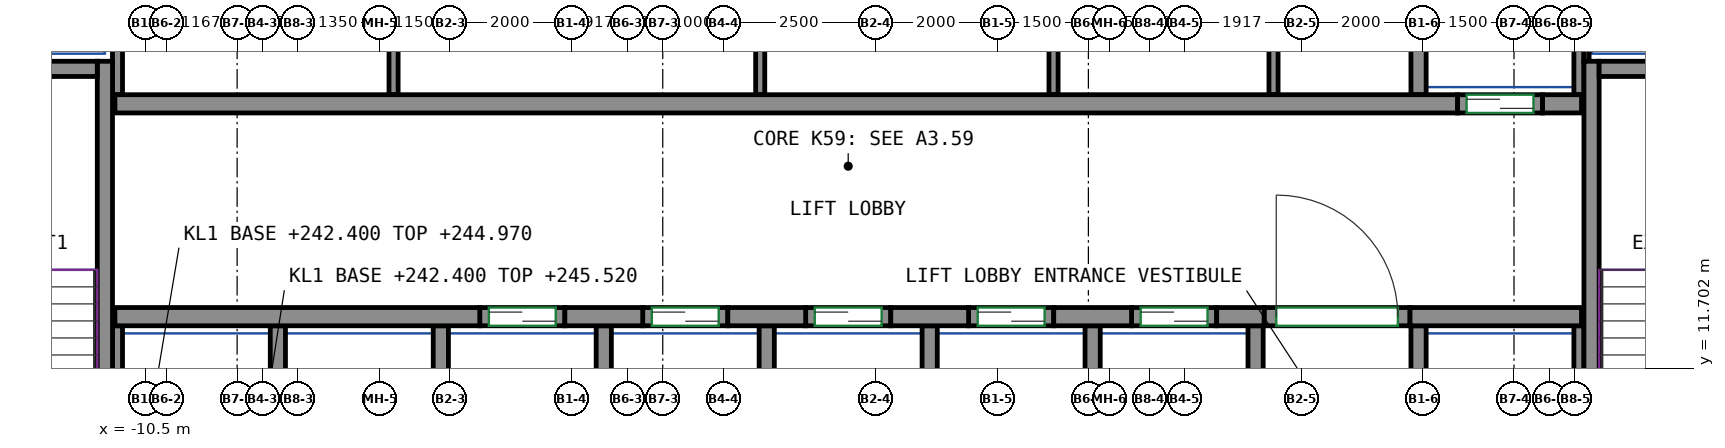
"""IFC4 building model, lengths in metres.
Left out: names, types, materials, properties, quantities, classifications, styles, units other than length and angle.
Written with IfcOpenShell. Run it as: python <this file> out.ifc"""

import sys

from ifc_helpers import new_model, si_unit, direction, frame, frame_2d, origin, place, context, subcontext, project, spatial, rectangle, extrude, source, transform, mapped, element, fill, save


model = new_model("IFC4")
c1 = context("Model", 3, precision=1e-05, world=origin(), true_north=direction((0.0, 1.0)))
c2 = subcontext(c1, "Body", "Model", "MODEL_VIEW")
j1 = project(units=[si_unit("LENGTHUNIT", "METRE"), si_unit("PLANEANGLEUNIT", "RADIAN")], contexts=[c1])
p1 = place(None, origin())
s1 = spatial("IfcSite", under=j1, at=p1, CompositionType="ELEMENT")
p2 = place(p1, origin())
s2 = spatial("IfcBuilding", under=s1, at=p2, CompositionType="ELEMENT")
p3 = place(p2, frame((0.0, 0.0, 242.4)))
s3 = spatial("IfcBuildingStorey", under=s2, at=p3, CompositionType="ELEMENT", Elevation=242.4)
m1 = source(origin(), c2, "Body", "SweptSolid", [
    extrude(rectangle(XDim=7.75, YDim=0.25, at=frame_2d((3.875, 0.0))), origin(), (0.0, 0.0, 1.0), 3.12),
])
p4 = place(p3, frame((-11.175, 9.0, 0.0), z_axis=(0.0, 0.0, 1.0), x_axis=(0.0, 1.0, 0.0)))
e1 = element("IfcWall", 1, at=p4, inside=s3, PredefinedType="SHEAR", context=c2, shape_type="MappedRepresentation", body=[
    mapped(m1, transform((0.0, 0.0, 0.0))),
])
m2 = source(origin(), c2, "Body", "SweptSolid", [
    extrude(rectangle(XDim=3.7, YDim=0.25, at=frame_2d((1.85, 0.0))), origin(), (0.0, 0.0, 1.0), 3.12),
])
p5 = place(p3, frame((-15.0, 16.625, 0.0), z_axis=(0.0, 0.0, 1.0), x_axis=(1.0, 0.0, 0.0)))
e2 = element("IfcWall", 2, at=p5, inside=s3, PredefinedType="SHEAR", context=c2, shape_type="MappedRepresentation", body=[
    mapped(m2, transform((0.0, 0.0, 0.0))),
])
p6 = place(p3, frame((13.275, 9.0, 0.0), z_axis=(0.0, 0.0, 1.0), x_axis=(0.0, 1.0, 0.0)))
e3 = element("IfcWall", 3, at=p6, inside=s3, PredefinedType="SHEAR", context=c2, shape_type="MappedRepresentation", body=[
    mapped(m1, transform((0.0, 0.0, 0.0))),
])
m3 = source(origin(), c2, "Body", "SweptSolid", [
    extrude(rectangle(XDim=3.7, YDim=0.25, at=frame_2d((1.85, 0.0))), origin(), (0.0, 0.0, 1.0), 3.12),
])
p7 = place(p3, frame((13.4, 16.625, 0.0), z_axis=(0.0, 0.0, 1.0), x_axis=(1.0, 0.0, 0.0)))
e4 = element("IfcWall", 4, at=p7, inside=s3, PredefinedType="SHEAR", context=c2, shape_type="MappedRepresentation", body=[
    mapped(m3, transform((0.0, 0.0, 0.0))),
])
m4 = source(origin(), c2, "Body", "SweptSolid", [
    extrude(rectangle(XDim=6.0, YDim=0.3, at=frame_2d((3.0, 0.0))), origin(), (0.0, 0.0, 1.0), 3.12),
])
p8 = place(p3, frame((-11.01, 12.55, 0.0), z_axis=(0.0, 0.0, 1.0), x_axis=(1.0, 0.0, 0.0)))
e5 = element("IfcWall", 5, at=p8, inside=s3, PredefinedType="SHEAR", context=c2, shape_type="MappedRepresentation", body=[
    mapped(m4, transform((0.0, 0.0, 0.0))),
])
m5 = source(origin(), c2, "Body", "SweptSolid", [
    extrude(rectangle(XDim=1.28, YDim=0.3, at=frame_2d((0.64, 0.0))), origin(), (0.0, 0.0, 1.0), 3.12),
])
for number, where, z_axis, x_axis in (
    (6, (-3.61, 12.55, 0.0), (0.0, 0.0, 1.0), (1.0, 0.0, 0.0)),
    (7, (-0.93, 12.55, 0.0), (0.0, 0.0, 1.0), (1.0, 0.0, 0.0)),
    (8, (1.75, 12.55, 0.0), (0.0, 0.0, 1.0), (1.0, 0.0, 0.0)),
    (9, (4.43, 12.55, 0.0), (0.0, 0.0, 1.0), (1.0, 0.0, 0.0)),
):
    element("IfcWall", number, at=place(p3, frame(where, z_axis=z_axis, x_axis=x_axis)), inside=s3, PredefinedType="SHEAR", context=c2, shape_type="MappedRepresentation", body=[
        mapped(m5, transform((0.0, 0.0, 0.0))),
    ])
m6 = source(origin(), c2, "Body", "SweptSolid", [
    extrude(rectangle(XDim=0.78, YDim=0.3, at=frame_2d((0.39, 0.0))), origin(), (0.0, 0.0, 1.0), 3.12),
])
p9 = place(p3, frame((7.11, 12.55, 0.0), z_axis=(0.0, 0.0, 1.0), x_axis=(1.0, 0.0, 0.0)))
e10 = element("IfcWall", 10, at=p9, inside=s3, PredefinedType="SHEAR", context=c2, shape_type="MappedRepresentation", body=[
    mapped(m6, transform((0.0, 0.0, 0.0))),
])
m7 = source(origin(), c2, "Body", "SweptSolid", [
    extrude(rectangle(XDim=2.82, YDim=0.3, at=frame_2d((1.41, 0.0))), origin(), (0.0, 0.0, 1.0), 3.12),
])
p10 = place(p3, frame((10.29, 12.55, 0.0), z_axis=(0.0, 0.0, 1.0), x_axis=(1.0, 0.0, 0.0)))
e11 = element("IfcWall", 11, at=p10, inside=s3, PredefinedType="SHEAR", context=c2, shape_type="MappedRepresentation", body=[
    mapped(m7, transform((0.0, 0.0, 0.0))),
])
m8 = source(origin(), c2, "Body", "SweptSolid", [
    extrude(rectangle(XDim=22.08, YDim=0.3, at=frame_2d((11.04, 0.0))), origin(), (0.0, 0.0, 1.0), 3.12),
])
p11 = place(p3, frame((-11.01, 16.05, 0.0), z_axis=(0.0, 0.0, 1.0), x_axis=(1.0, 0.0, 0.0)))
e12 = element("IfcWall", 12, at=p11, inside=s3, PredefinedType="SHEAR", context=c2, shape_type="MappedRepresentation", body=[
    mapped(m8, transform((0.0, 0.0, 0.0))),
])
m9 = source(origin(), c2, "Body", "SweptSolid", [
    extrude(rectangle(XDim=0.64, YDim=0.3, at=frame_2d((0.32, 0.0))), origin(), (0.0, 0.0, 1.0), 3.12),
])
p12 = place(p3, frame((12.47, 16.05, 0.0), z_axis=(0.0, 0.0, 1.0), x_axis=(1.0, 0.0, 0.0)))
e13 = element("IfcWall", 13, at=p12, inside=s3, PredefinedType="SHEAR", context=c2, shape_type="MappedRepresentation", body=[
    mapped(m9, transform((0.0, 0.0, 0.0))),
])
m10 = source(origin(), c2, "Body", "SweptSolid", [
    extrude(rectangle(XDim=1.4, YDim=0.3, at=frame_2d((0.7, 0.0))), origin(), (0.0, 0.0, 1.0), 3.12),
])
p13 = place(p3, frame((-5.01, 12.55, 0.0), z_axis=(0.0, 0.0, 1.0), x_axis=(1.0, 0.0, 0.0)))
e14 = element("IfcWall", 14, at=p13, inside=s3, PredefinedType="PARTITIONING", context=c2, shape_type="MappedRepresentation", body=[
    mapped(m10, transform((0.0, 0.0, 0.0))),
])
p14 = place(p13, frame((0.15, 0.0, 0.0)))
e15 = element("IfcOpeningElement", 15, at=p14, cuts=e14, PredefinedType="OPENING", context=c2, shape_type="SweptSolid", body=[
    extrude(rectangle(XDim=1.1, YDim=2.1, at=frame_2d((0.55, 1.05))), frame((0.0, 0.16, 0.0), z_axis=(0.0, -1.0, 0.0), x_axis=(1.0, 0.0, 0.0)), (0.0, 0.0, 1.0), 0.32),
])
m11 = source(origin(), c2, "Body", "SweptSolid", [
    extrude(rectangle(XDim=1.4, YDim=0.3, at=frame_2d((0.7, 0.0))), origin(), (0.0, 0.0, 1.0), 3.12),
])
p15 = place(p3, frame((-2.33, 12.55, 0.0), z_axis=(0.0, 0.0, 1.0), x_axis=(1.0, 0.0, 0.0)))
e16 = element("IfcWall", 16, at=p15, inside=s3, PredefinedType="PARTITIONING", context=c2, shape_type="MappedRepresentation", body=[
    mapped(m11, transform((0.0, 0.0, 0.0))),
])
p16 = place(p15, frame((0.15, 0.0, 0.0)))
e17 = element("IfcOpeningElement", 17, at=p16, cuts=e16, PredefinedType="OPENING", context=c2, shape_type="SweptSolid", body=[
    extrude(rectangle(XDim=1.1, YDim=2.1, at=frame_2d((0.55, 1.05))), frame((0.0, 0.16, 0.0), z_axis=(0.0, -1.0, 0.0), x_axis=(1.0, 0.0, 0.0)), (0.0, 0.0, 1.0), 0.32),
])
p17 = place(p3, frame((0.35, 12.55, 0.0), z_axis=(0.0, 0.0, 1.0), x_axis=(1.0, 0.0, 0.0)))
e18 = element("IfcWall", 18, at=p17, inside=s3, PredefinedType="PARTITIONING", context=c2, shape_type="MappedRepresentation", body=[
    mapped(m10, transform((0.0, 0.0, 0.0))),
])
p18 = place(p17, frame((0.15, 0.0, 0.0)))
e19 = element("IfcOpeningElement", 19, at=p18, cuts=e18, PredefinedType="OPENING", context=c2, shape_type="SweptSolid", body=[
    extrude(rectangle(XDim=1.1, YDim=2.1, at=frame_2d((0.55, 1.05))), frame((0.0, 0.16, 0.0), z_axis=(0.0, -1.0, 0.0), x_axis=(1.0, 0.0, 0.0)), (0.0, 0.0, 1.0), 0.32),
])
p19 = place(p3, frame((3.03, 12.55, 0.0), z_axis=(0.0, 0.0, 1.0), x_axis=(1.0, 0.0, 0.0)))
e20 = element("IfcWall", 20, at=p19, inside=s3, PredefinedType="PARTITIONING", context=c2, shape_type="MappedRepresentation", body=[
    mapped(m10, transform((0.0, 0.0, 0.0))),
])
p20 = place(p19, frame((0.15, 0.0, 0.0)))
e21 = element("IfcOpeningElement", 21, at=p20, cuts=e20, PredefinedType="OPENING", context=c2, shape_type="SweptSolid", body=[
    extrude(rectangle(XDim=1.1, YDim=2.1, at=frame_2d((0.55, 1.05))), frame((0.0, 0.16, 0.0), z_axis=(0.0, -1.0, 0.0), x_axis=(1.0, 0.0, 0.0)), (0.0, 0.0, 1.0), 0.32),
])
p21 = place(p3, frame((5.71, 12.55, 0.0), z_axis=(0.0, 0.0, 1.0), x_axis=(1.0, 0.0, 0.0)))
e22 = element("IfcWall", 22, at=p21, inside=s3, PredefinedType="PARTITIONING", context=c2, shape_type="MappedRepresentation", body=[
    mapped(m11, transform((0.0, 0.0, 0.0))),
])
p22 = place(p21, frame((0.15, 0.0, 0.0)))
e23 = element("IfcOpeningElement", 23, at=p22, cuts=e22, PredefinedType="OPENING", context=c2, shape_type="SweptSolid", body=[
    extrude(rectangle(XDim=1.1, YDim=2.1, at=frame_2d((0.55, 1.05))), frame((0.0, 0.16, 0.0), z_axis=(0.0, -1.0, 0.0), x_axis=(1.0, 0.0, 0.0)), (0.0, 0.0, 1.0), 0.32),
])
p23 = place(p3, frame((11.07, 16.05, 0.0), z_axis=(0.0, 0.0, 1.0), x_axis=(1.0, 0.0, 0.0)))
e24 = element("IfcWall", 24, at=p23, inside=s3, PredefinedType="PARTITIONING", context=c2, shape_type="MappedRepresentation", body=[
    mapped(m10, transform((0.0, 0.0, 0.0))),
])
p24 = place(p23, frame((0.15, 0.0, 0.0)))
e25 = element("IfcOpeningElement", 25, at=p24, cuts=e24, PredefinedType="OPENING", context=c2, shape_type="SweptSolid", body=[
    extrude(rectangle(XDim=1.1, YDim=2.1, at=frame_2d((0.55, 1.05))), frame((0.0, 0.16, 0.0), z_axis=(0.0, -1.0, 0.0), x_axis=(1.0, 0.0, 0.0)), (0.0, 0.0, 1.0), 0.32),
])
m12 = source(origin(), c2, "Body", "SweptSolid", [
    extrude(rectangle(XDim=2.4, YDim=0.3, at=frame_2d((1.2, 0.0))), origin(), (0.0, 0.0, 1.0), 3.12),
])
p25 = place(p3, frame((7.89, 12.55, 0.0), z_axis=(0.0, 0.0, 1.0), x_axis=(1.0, 0.0, 0.0)))
e26 = element("IfcWall", 26, at=p25, inside=s3, PredefinedType="PARTITIONING", context=c2, shape_type="MappedRepresentation", body=[
    mapped(m12, transform((0.0, 0.0, 0.0))),
])
p26 = place(p25, frame((0.2, 0.0, 0.0)))
e27 = element("IfcOpeningElement", 27, at=p26, cuts=e26, PredefinedType="OPENING", context=c2, shape_type="SweptSolid", body=[
    extrude(rectangle(XDim=2.0, YDim=2.1, at=frame_2d((1.0, 1.05))), frame((0.0, 0.16, 0.0), z_axis=(0.0, -1.0, 0.0), x_axis=(1.0, 0.0, 0.0)), (0.0, 0.0, 1.0), 0.32),
])
m13 = source(origin(), c2, "Body", "SweptSolid", [
    extrude(rectangle(XDim=3.275, YDim=0.165, at=frame_2d((1.638, 0.0))), origin(), (0.0, 0.0, 1.0), 3.12),
])
p27 = place(p3, frame((13.067, 16.2, 0.0), z_axis=(0.0, 0.0, 1.0), x_axis=(0.0, 1.0, 0.0)))
e28 = element("IfcWall", 28, at=p27, inside=s3, PredefinedType="PARTITIONING", context=c2, shape_type="MappedRepresentation", body=[
    mapped(m13, transform((0.0, 0.0, 0.0))),
])
m14 = source(origin(), c2, "Body", "SweptSolid", [
    extrude(rectangle(XDim=4.8, YDim=0.165, at=frame_2d((2.4, 0.0))), origin(), (0.0, 0.0, 1.0), 3.12),
])
p28 = place(p3, frame((-10.968, 16.2, 0.0), z_axis=(0.0, 0.0, 1.0), x_axis=(0.0, 1.0, 0.0)))
e29 = element("IfcWall", 29, at=p28, inside=s3, PredefinedType="PARTITIONING", context=c2, shape_type="MappedRepresentation", body=[
    mapped(m14, transform((0.0, 0.0, 0.0))),
])
m15 = source(origin(), c2, "Body", "SweptSolid", [
    extrude(rectangle(XDim=3.275, YDim=0.25, at=frame_2d((1.638, 0.0))), origin(), (0.0, 0.0, 1.0), 3.12),
])
p29 = place(p3, frame((10.43, 16.2, 0.0), z_axis=(0.0, 0.0, 1.0), x_axis=(0.0, 1.0, 0.0)))
e30 = element("IfcWall", 30, at=p29, inside=s3, PredefinedType="PARTITIONING", context=c2, shape_type="MappedRepresentation", body=[
    mapped(m15, transform((0.0, 0.0, 0.0))),
])
m16 = source(origin(), c2, "Body", "SweptSolid", [
    extrude(rectangle(XDim=2.725, YDim=0.085, at=frame_2d((1.363, 0.0))), origin(), (0.0, 0.0, 1.0), 3.12),
])
p30 = place(p3, frame((13.192, 16.75, 0.0), z_axis=(0.0, 0.0, 1.0), x_axis=(0.0, 1.0, 0.0)))
e31 = element("IfcWall", 31, at=p30, inside=s3, PredefinedType="PARTITIONING", context=c2, shape_type="MappedRepresentation", body=[
    mapped(m16, transform((0.0, 0.0, 0.0))),
])
m17 = source(origin(), c2, "Body", "SweptSolid", [
    extrude(rectangle(XDim=3.4, YDim=0.25, at=frame_2d((1.7, 0.0))), origin(), (0.0, 0.0, 1.0), 3.12),
])
p31 = place(p3, frame((10.43, 9.0, 0.0), z_axis=(0.0, 0.0, 1.0), x_axis=(0.0, 1.0, 0.0)))
e32 = element("IfcWall", 32, at=p31, inside=s3, PredefinedType="PARTITIONING", context=c2, shape_type="MappedRepresentation", body=[
    mapped(m17, transform((0.0, 0.0, 0.0))),
])
m18 = source(origin(), c2, "Body", "SweptSolid", [
    extrude(rectangle(XDim=3.4, YDim=0.165, at=frame_2d((1.7, 0.0))), origin(), (0.0, 0.0, 1.0), 3.12),
])
p32 = place(p3, frame((13.067, 9.0, 0.0), z_axis=(0.0, 0.0, 1.0), x_axis=(0.0, 1.0, 0.0)))
e33 = element("IfcWall", 33, at=p32, inside=s3, PredefinedType="PARTITIONING", context=c2, shape_type="MappedRepresentation", body=[
    mapped(m18, transform((0.0, 0.0, 0.0))),
])
for number, where, z_axis, x_axis in (
    (34, (2.39, 9.0, 0.0), (0.0, 0.0, 1.0), (0.0, 1.0, 0.0)),
    (35, (5.07, 9.0, 0.0), (0.0, 0.0, 1.0), (0.0, 1.0, 0.0)),
    (36, (7.75, 9.0, 0.0), (0.0, 0.0, 1.0), (0.0, 1.0, 0.0)),
    (37, (-0.29, 9.0, 0.0), (0.0, 0.0, 1.0), (0.0, 1.0, 0.0)),
):
    element("IfcWall", number, at=place(p3, frame(where, z_axis=z_axis, x_axis=x_axis)), inside=s3, PredefinedType="PARTITIONING", context=c2, shape_type="MappedRepresentation", body=[
        mapped(m17, transform((0.0, 0.0, 0.0))),
    ])
p33 = place(p3, frame((-10.968, 9.0, 0.0), z_axis=(0.0, 0.0, 1.0), x_axis=(0.0, 1.0, 0.0)))
e38 = element("IfcWall", 38, at=p33, inside=s3, PredefinedType="PARTITIONING", context=c2, shape_type="MappedRepresentation", body=[
    mapped(m18, transform((0.0, 0.0, 0.0))),
])
for number, where, z_axis, x_axis in (
    (39, (-2.97, 9.0, 0.0), (0.0, 0.0, 1.0), (0.0, 1.0, 0.0)),
    (40, (-5.65, 9.0, 0.0), (0.0, 0.0, 1.0), (0.0, 1.0, 0.0)),
    (41, (-8.33, 9.0, 0.0), (0.0, 0.0, 1.0), (0.0, 1.0, 0.0)),
):
    element("IfcWall", number, at=place(p3, frame(where, z_axis=z_axis, x_axis=x_axis)), inside=s3, PredefinedType="PARTITIONING", context=c2, shape_type="MappedRepresentation", body=[
        mapped(m17, transform((0.0, 0.0, 0.0))),
    ])
m19 = source(origin(), c2, "Body", "SweptSolid", [
    extrude(rectangle(XDim=4.8, YDim=0.15, at=frame_2d((2.4, 0.0))), origin(), (0.0, 0.0, 1.0), 3.12),
])
for number, where, z_axis, x_axis in (
    (42, (-6.427, 16.2, 0.0), (0.0, 0.0, 1.0), (0.0, 1.0, 0.0)),
    (43, (-0.397, 16.2, 0.0), (0.0, 0.0, 1.0), (0.0, 1.0, 0.0)),
    (44, (4.427, 16.2, 0.0), (0.0, 0.0, 1.0), (0.0, 1.0, 0.0)),
    (45, (8.045, 16.2, 0.0), (0.0, 0.0, 1.0), (0.0, 1.0, 0.0)),
):
    element("IfcWall", number, at=place(p3, frame(where, z_axis=z_axis, x_axis=x_axis)), inside=s3, PredefinedType="PARTITIONING", context=c2, shape_type="MappedRepresentation", body=[
        mapped(m19, transform((0.0, 0.0, 0.0))),
    ])
p34 = place(p26, origin())
e46 = element("IfcDoor", 46, at=p34, inside=s3, OperationType="DOUBLE_DOOR_SINGLE_SWING", PredefinedType="DOOR", context=c2, shape_type="SweptSolid", body=[
    extrude(rectangle(XDim=2.0, YDim=2.1, at=frame_2d((1.0, 1.05))), frame((0.0, 0.025, 0.0), z_axis=(0.0, -1.0, 0.0), x_axis=(1.0, 0.0, 0.0)), (0.0, 0.0, 1.0), 0.05),
])
fill(e27, e46)
p35 = place(p14, origin())
e47 = element("IfcDoor", 47, at=p35, inside=s3, OperationType="DOUBLE_DOOR_SLIDING", PredefinedType="DOOR", context=c2, shape_type="SweptSolid", body=[
    extrude(rectangle(XDim=1.1, YDim=2.1, at=frame_2d((0.55, 1.05))), frame((0.0, 0.025, 0.0), z_axis=(0.0, -1.0, 0.0), x_axis=(1.0, 0.0, 0.0)), (0.0, 0.0, 1.0), 0.05),
])
fill(e15, e47)
p36 = place(p16, origin())
e48 = element("IfcDoor", 48, at=p36, inside=s3, OperationType="DOUBLE_DOOR_SLIDING", PredefinedType="DOOR", context=c2, shape_type="SweptSolid", body=[
    extrude(rectangle(XDim=1.1, YDim=2.1, at=frame_2d((0.55, 1.05))), frame((0.0, 0.025, 0.0), z_axis=(0.0, -1.0, 0.0), x_axis=(1.0, 0.0, 0.0)), (0.0, 0.0, 1.0), 0.05),
])
fill(e17, e48)
p37 = place(p18, origin())
e49 = element("IfcDoor", 49, at=p37, inside=s3, OperationType="DOUBLE_DOOR_SLIDING", PredefinedType="DOOR", context=c2, shape_type="SweptSolid", body=[
    extrude(rectangle(XDim=1.1, YDim=2.1, at=frame_2d((0.55, 1.05))), frame((0.0, 0.025, 0.0), z_axis=(0.0, -1.0, 0.0), x_axis=(1.0, 0.0, 0.0)), (0.0, 0.0, 1.0), 0.05),
])
fill(e19, e49)
p38 = place(p20, origin())
e50 = element("IfcDoor", 50, at=p38, inside=s3, OperationType="DOUBLE_DOOR_SLIDING", PredefinedType="DOOR", context=c2, shape_type="SweptSolid", body=[
    extrude(rectangle(XDim=1.1, YDim=2.1, at=frame_2d((0.55, 1.05))), frame((0.0, 0.025, 0.0), z_axis=(0.0, -1.0, 0.0), x_axis=(1.0, 0.0, 0.0)), (0.0, 0.0, 1.0), 0.05),
])
fill(e21, e50)
p39 = place(p22, origin())
e51 = element("IfcDoor", 51, at=p39, inside=s3, OperationType="DOUBLE_DOOR_SLIDING", PredefinedType="DOOR", context=c2, shape_type="SweptSolid", body=[
    extrude(rectangle(XDim=1.1, YDim=2.1, at=frame_2d((0.55, 1.05))), frame((0.0, 0.025, 0.0), z_axis=(0.0, -1.0, 0.0), x_axis=(1.0, 0.0, 0.0)), (0.0, 0.0, 1.0), 0.05),
])
fill(e23, e51)
p40 = place(p24, origin())
e52 = element("IfcDoor", 52, at=p40, inside=s3, OperationType="DOUBLE_DOOR_SLIDING", PredefinedType="DOOR", context=c2, shape_type="SweptSolid", body=[
    extrude(rectangle(XDim=1.1, YDim=2.1, at=frame_2d((0.55, 1.05))), frame((0.0, 0.025, 0.0), z_axis=(0.0, -1.0, 0.0), x_axis=(1.0, 0.0, 0.0)), (0.0, 0.0, 1.0), 0.05),
])
fill(e25, e52)
save(model, sys.argv[1])
